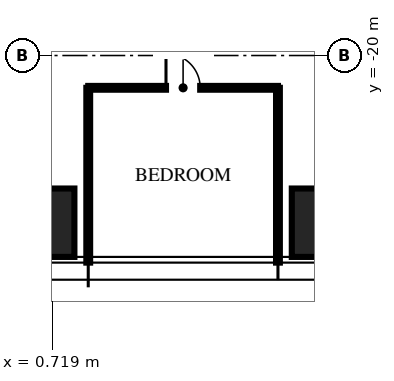
"""IFC4 building model, lengths in metres.
Left out: names, types, materials, properties, quantities, classifications, styles, units other than length and angle.
Written with IfcOpenShell. Run it as: python <this file> out.ifc"""

import sys

from ifc_helpers import new_model, si_unit, direction, frame, frame_2d, origin, origin_2d, place, context, subcontext, project, spatial, rectangle, hollow_rectangle, extrude, element, fill, save


model = new_model("IFC4")
c1 = context("Model", 3, precision=1e-05, world=origin(), true_north=direction((0.0, 1.0)))
c2 = subcontext(c1, "Body", "Model", "MODEL_VIEW")
j1 = project(units=[si_unit("LENGTHUNIT", "METRE"), si_unit("PLANEANGLEUNIT", "RADIAN")], contexts=[c1])
p1 = place(None, origin())
s1 = spatial("IfcSite", under=j1, at=p1, CompositionType="ELEMENT")
p2 = place(p1, origin())
s2 = spatial("IfcBuilding", under=s1, at=p2, CompositionType="ELEMENT")
p3 = place(p2, frame((0.0, 0.0, 274.5)))
s3 = spatial("IfcBuildingStorey", under=s2, at=p3, CompositionType="ELEMENT", Elevation=274.5)
p4 = place(p3, frame((8.32, -24.4, 0.0), z_axis=(0.0, 0.0, 1.0), x_axis=(1.0, 0.0, 0.0)))
e1 = element("IfcColumn", 1, at=p4, inside=s3, PredefinedType="COLUMN", context=c2, shape_type="SweptSolid", body=[
    extrude(hollow_rectangle(XDim=2.6, YDim=1.8, WallThickness=0.14, at=origin_2d()), origin(), (0.0, 0.0, 1.0), 2.64),
])
p5 = place(p3, frame((0.0, -24.4, 0.0), z_axis=(0.0, 0.0, 1.0), x_axis=(1.0, 0.0, 0.0)))
e2 = element("IfcColumn", 2, at=p5, inside=s3, PredefinedType="COLUMN", context=c2, shape_type="SweptSolid", body=[
    extrude(hollow_rectangle(XDim=2.6, YDim=1.8, WallThickness=0.14, at=origin_2d()), origin(), (0.0, 0.0, 1.0), 2.78),
])
for number, where, z_axis, x_axis in (
    (3, (1.664, -20.85, 0.0), (0.0, 0.0, 1.0), (0.0, -1.0, 0.0)),
    (4, (6.656, -20.85, 0.0), (0.0, 0.0, 1.0), (0.0, -1.0, 0.0)),
):
    element("IfcWall", number, at=place(p3, frame(where, z_axis=z_axis, x_axis=x_axis)), inside=s3, PredefinedType="PARTITIONING", context=c2, shape_type="SweptSolid", body=[
        extrude(rectangle(XDim=4.6, YDim=0.1, at=frame_2d((2.3, 0.0))), origin(), (0.0, 0.0, 1.0), 2.75),
    ])
p6 = place(p3, frame((1.664, -20.85, 0.0), z_axis=(0.0, 0.0, 1.0), x_axis=(1.0, 0.0, 0.0)))
e5 = element("IfcWall", 5, at=p6, inside=s3, PredefinedType="PARTITIONING", context=c2, shape_type="SweptSolid", body=[
    extrude(rectangle(XDim=4.992, YDim=0.1, at=frame_2d((2.496, 0.0))), origin(), (0.0, 0.0, 1.0), 2.2),
])
p7 = place(p6, frame((2.046, 0.0, 0.0)))
e6 = element("IfcOpeningElement", 6, at=p7, cuts=e5, PredefinedType="OPENING", context=c2, shape_type="SweptSolid", body=[
    extrude(rectangle(XDim=0.9, YDim=2.1, at=frame_2d((0.45, 1.05))), frame((0.0, 0.06, 0.0), z_axis=(0.0, -1.0, 0.0), x_axis=(1.0, 0.0, 0.0)), (0.0, 0.0, 1.0), 0.12),
])
p8 = place(p7, origin())
e7 = element("IfcDoor", 7, at=p8, inside=s3, OperationType="SINGLE_SWING_LEFT", PredefinedType="DOOR", context=c2, shape_type="SweptSolid", body=[
    extrude(rectangle(XDim=0.9, YDim=2.1, at=frame_2d((0.45, 1.05))), frame((0.0, 0.025, 0.0), z_axis=(0.0, -1.0, 0.0), x_axis=(1.0, 0.0, 0.0)), (0.0, 0.0, 1.0), 0.05),
])
fill(e6, e7)
save(model, sys.argv[1])
